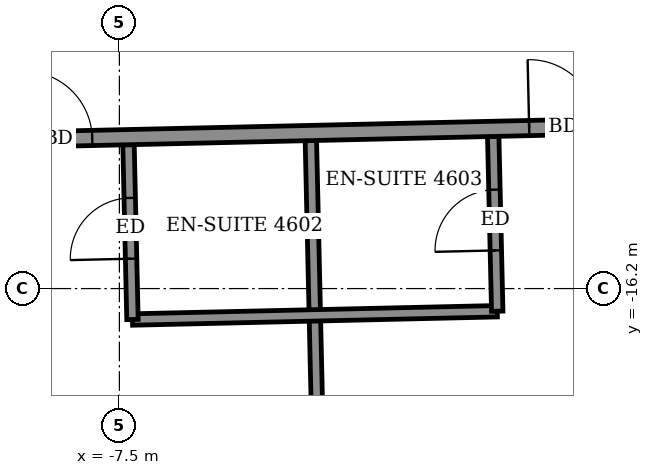
"""IFC4 building model, lengths in metres.
Left out: names, types, materials, properties, quantities, classifications, styles, units other than length and angle.
Written with IfcOpenShell. Run it as: python <this file> out.ifc"""

import sys

from ifc_helpers import new_model, si_unit, direction, frame, frame_2d, origin, place, context, subcontext, project, spatial, rectangle, extrude, element, fill, save


model = new_model("IFC4")
c1 = context("Model", 3, precision=1e-05, world=origin(), true_north=direction((0.0, 1.0)))
c2 = subcontext(c1, "Body", "Model", "MODEL_VIEW")
j1 = project(units=[si_unit("LENGTHUNIT", "METRE"), si_unit("PLANEANGLEUNIT", "RADIAN")], contexts=[c1])
p1 = place(None, origin())
s1 = spatial("IfcSite", under=j1, at=p1, CompositionType="ELEMENT")
p2 = place(p1, origin())
s2 = spatial("IfcBuilding", under=s1, at=p2, CompositionType="ELEMENT")
p3 = place(p2, frame((0.0, 0.0, 182.5)))
s3 = spatial("IfcBuildingStorey", under=s2, at=p3, CompositionType="ELEMENT", Elevation=182.5)
p4 = place(p3, frame((-4.846, -20.202, 0.0), z_axis=(0.0, 0.0, 1.0), x_axis=(-0.022688785847, 0.999742576365, 0.0)))
e1 = element("IfcWall", 1, at=p4, inside=s3, PredefinedType="PARTITIONING", context=c2, shape_type="SweptSolid", body=[
    extrude(rectangle(XDim=5.95, YDim=0.15, at=frame_2d((2.975, 0.0))), origin(), (0.0, 0.0, 1.0), 3.05),
])
p5 = place(p3, frame((-7.328, -16.607, 0.0), z_axis=(0.0, 0.0, 1.0), x_axis=(0.999742675121, 0.022684433919, 0.0)))
e2 = element("IfcWall", 2, at=p5, inside=s3, PredefinedType="PARTITIONING", context=c2, shape_type="SweptSolid", body=[
    extrude(rectangle(XDim=4.8, YDim=0.15, at=frame_2d((2.4, 0.0))), origin(), (0.0, 0.0, 1.0), 3.05),
])
p6 = place(p3, frame((-7.328, -16.607, 0.0), z_axis=(0.0, 0.0, 1.0), x_axis=(-0.022615284993, 0.999744241736, 0.0)))
e3 = element("IfcWall", 3, at=p6, inside=s3, PredefinedType="PARTITIONING", context=c2, shape_type="SweptSolid", body=[
    extrude(rectangle(XDim=2.299, YDim=0.15, at=frame_2d((1.15, 0.0))), origin(), (0.0, 0.0, 1.0), 3.05),
])
p7 = place(p6, frame((0.8, 0.0, 0.0)))
e4 = element("IfcOpeningElement", 4, at=p7, cuts=e3, PredefinedType="OPENING", context=c2, shape_type="SweptSolid", body=[
    extrude(rectangle(XDim=0.8, YDim=2.1, at=frame_2d((0.4, 1.05))), frame((0.0, 0.085, 0.0), z_axis=(0.0, -1.0, 0.0), x_axis=(1.0, 0.0, 0.0)), (0.0, 0.0, 1.0), 0.17),
])
p8 = place(p3, frame((-2.529, -16.498, 0.0), z_axis=(0.0, 0.0, 1.0), x_axis=(-0.023037316498, 0.999734605807, 0.0)))
e5 = element("IfcWall", 5, at=p8, inside=s3, PredefinedType="PARTITIONING", context=c2, shape_type="SweptSolid", body=[
    extrude(rectangle(XDim=2.3, YDim=0.15, at=frame_2d((1.15, 0.0))), origin(), (0.0, 0.0, 1.0), 3.05),
])
p9 = place(p8, frame((0.8, 0.0, 0.0)))
e6 = element("IfcOpeningElement", 6, at=p9, cuts=e5, PredefinedType="OPENING", context=c2, shape_type="SweptSolid", body=[
    extrude(rectangle(XDim=0.8, YDim=2.1, at=frame_2d((0.4, 1.05))), frame((0.0, 0.085, 0.0), z_axis=(0.0, -1.0, 0.0), x_axis=(1.0, 0.0, 0.0)), (0.0, 0.0, 1.0), 0.17),
])
p10 = place(p3, frame((-21.279, -14.523, 0.0), z_axis=(0.0, 0.0, 1.0), x_axis=(0.999742878501, 0.022675468818, 0.0)))
e7 = element("IfcWall", 7, at=p10, inside=s3, PredefinedType="PARTITIONING", context=c2, shape_type="SweptSolid", body=[
    extrude(rectangle(XDim=46.48, YDim=0.2, at=frame_2d((23.24, 0.0))), origin(), (0.0, 0.0, 1.0), 3.05),
])
p11 = place(p10, frame((1.325, 0.0, 0.0)))
e8 = element("IfcOpeningElement", 8, at=p11, cuts=e7, PredefinedType="OPENING", context=c2, shape_type="SweptSolid", body=[
    extrude(rectangle(XDim=1.0, YDim=2.1, at=frame_2d((0.5, 1.05))), frame((0.0, 0.11, 0.0), z_axis=(0.0, -1.0, 0.0), x_axis=(1.0, 0.0, 0.0)), (0.0, 0.0, 1.0), 0.22),
])
p12 = place(p10, frame((5.9, 0.0, 0.0)))
e9 = element("IfcOpeningElement", 9, at=p12, cuts=e7, PredefinedType="OPENING", context=c2, shape_type="SweptSolid", body=[
    extrude(rectangle(XDim=0.9, YDim=2.1, at=frame_2d((0.45, 1.05))), frame((0.0, 0.11, 0.0), z_axis=(0.0, -1.0, 0.0), x_axis=(1.0, 0.0, 0.0)), (0.0, 0.0, 1.0), 0.22),
])
p13 = place(p10, frame((10.6, 0.0, 0.0)))
e10 = element("IfcOpeningElement", 10, at=p13, cuts=e7, PredefinedType="OPENING", context=c2, shape_type="SweptSolid", body=[
    extrude(rectangle(XDim=0.9, YDim=2.1, at=frame_2d((0.45, 1.05))), frame((0.0, 0.11, 0.0), z_axis=(0.0, -1.0, 0.0), x_axis=(1.0, 0.0, 0.0)), (0.0, 0.0, 1.0), 0.22),
])
p14 = place(p10, frame((12.525, 0.0, 0.0)))
e11 = element("IfcOpeningElement", 11, at=p14, cuts=e7, PredefinedType="OPENING", context=c2, shape_type="SweptSolid", body=[
    extrude(rectangle(XDim=0.9, YDim=2.1, at=frame_2d((0.45, 1.05))), frame((0.0, 0.11, 0.0), z_axis=(0.0, -1.0, 0.0), x_axis=(1.0, 0.0, 0.0)), (0.0, 0.0, 1.0), 0.22),
])
p15 = place(p10, frame((19.175, 0.0, 0.0)))
e12 = element("IfcOpeningElement", 12, at=p15, cuts=e7, PredefinedType="OPENING", context=c2, shape_type="SweptSolid", body=[
    extrude(rectangle(XDim=0.9, YDim=2.1, at=frame_2d((0.45, 1.05))), frame((0.0, 0.11, 0.0), z_axis=(0.0, -1.0, 0.0), x_axis=(1.0, 0.0, 0.0)), (0.0, 0.0, 1.0), 0.22),
])
p16 = place(p10, frame((21.05, 0.0, 0.0)))
e13 = element("IfcOpeningElement", 13, at=p16, cuts=e7, PredefinedType="OPENING", context=c2, shape_type="SweptSolid", body=[
    extrude(rectangle(XDim=0.9, YDim=2.1, at=frame_2d((0.45, 1.05))), frame((0.0, 0.11, 0.0), z_axis=(0.0, -1.0, 0.0), x_axis=(1.0, 0.0, 0.0)), (0.0, 0.0, 1.0), 0.22),
])
p17 = place(p10, frame((27.725, 0.0, 0.0)))
e14 = element("IfcOpeningElement", 14, at=p17, cuts=e7, PredefinedType="OPENING", context=c2, shape_type="SweptSolid", body=[
    extrude(rectangle(XDim=0.9, YDim=2.1, at=frame_2d((0.45, 1.05))), frame((0.0, 0.11, 0.0), z_axis=(0.0, -1.0, 0.0), x_axis=(1.0, 0.0, 0.0)), (0.0, 0.0, 1.0), 0.22),
])
p18 = place(p10, frame((29.6, 0.0, 0.0)))
e15 = element("IfcOpeningElement", 15, at=p18, cuts=e7, PredefinedType="OPENING", context=c2, shape_type="SweptSolid", body=[
    extrude(rectangle(XDim=0.9, YDim=2.1, at=frame_2d((0.45, 1.05))), frame((0.0, 0.11, 0.0), z_axis=(0.0, -1.0, 0.0), x_axis=(1.0, 0.0, 0.0)), (0.0, 0.0, 1.0), 0.22),
])
p19 = place(p10, frame((36.325, 0.0, 0.0)))
e16 = element("IfcOpeningElement", 16, at=p19, cuts=e7, PredefinedType="OPENING", context=c2, shape_type="SweptSolid", body=[
    extrude(rectangle(XDim=0.9, YDim=2.1, at=frame_2d((0.45, 1.05))), frame((0.0, 0.11, 0.0), z_axis=(0.0, -1.0, 0.0), x_axis=(1.0, 0.0, 0.0)), (0.0, 0.0, 1.0), 0.22),
])
p20 = place(p10, frame((43.915, 0.0, 0.0)))
e17 = element("IfcOpeningElement", 17, at=p20, cuts=e7, PredefinedType="OPENING", context=c2, shape_type="SweptSolid", body=[
    extrude(rectangle(XDim=1.0, YDim=2.1, at=frame_2d((0.5, 1.05))), frame((0.0, 0.11, 0.0), z_axis=(0.0, -1.0, 0.0), x_axis=(1.0, 0.0, 0.0)), (0.0, 0.0, 1.0), 0.22),
])
p21 = place(p10, frame((38.6, 0.0, 0.0)))
e18 = element("IfcOpeningElement", 18, at=p21, cuts=e7, PredefinedType="OPENING", context=c2, shape_type="SweptSolid", body=[
    extrude(rectangle(XDim=0.9, YDim=2.1, at=frame_2d((0.45, 1.05))), frame((0.0, 0.11, 0.0), z_axis=(0.0, -1.0, 0.0), x_axis=(1.0, 0.0, 0.0)), (0.0, 0.0, 1.0), 0.22),
])
p22 = place(p14, origin())
e19 = element("IfcDoor", 19, at=p22, inside=s3, OperationType="SINGLE_SWING_RIGHT", PredefinedType="DOOR", context=c2, shape_type="SweptSolid", body=[
    extrude(rectangle(XDim=0.9, YDim=2.1, at=frame_2d((0.45, 1.05))), frame((0.0, 0.025, 0.0), z_axis=(0.0, -1.0, 0.0), x_axis=(1.0, 0.0, 0.0)), (0.0, 0.0, 1.0), 0.05),
])
fill(e11, e19)
p23 = place(p7, origin())
e20 = element("IfcDoor", 20, at=p23, inside=s3, OperationType="SINGLE_SWING_RIGHT", PredefinedType="DOOR", context=c2, shape_type="SweptSolid", body=[
    extrude(rectangle(XDim=0.8, YDim=2.1, at=frame_2d((0.4, 1.05))), frame((0.0, 0.025, 0.0), z_axis=(0.0, -1.0, 0.0), x_axis=(1.0, 0.0, 0.0)), (0.0, 0.0, 1.0), 0.05),
])
fill(e4, e20)
p24 = place(p15, origin())
e21 = element("IfcDoor", 21, at=p24, inside=s3, OperationType="SINGLE_SWING_LEFT", PredefinedType="DOOR", context=c2, shape_type="SweptSolid", body=[
    extrude(rectangle(XDim=0.9, YDim=2.1, at=frame_2d((0.45, 1.05))), frame((0.0, 0.025, 0.0), z_axis=(0.0, -1.0, 0.0), x_axis=(1.0, 0.0, 0.0)), (0.0, 0.0, 1.0), 0.05),
])
fill(e12, e21)
p25 = place(p9, origin())
e22 = element("IfcDoor", 22, at=p25, inside=s3, OperationType="SINGLE_SWING_LEFT", PredefinedType="DOOR", context=c2, shape_type="SweptSolid", body=[
    extrude(rectangle(XDim=0.8, YDim=2.1, at=frame_2d((0.4, 1.05))), frame((0.0, 0.025, 0.0), z_axis=(0.0, -1.0, 0.0), x_axis=(1.0, 0.0, 0.0)), (0.0, 0.0, 1.0), 0.05),
])
fill(e6, e22)
save(model, sys.argv[1])
